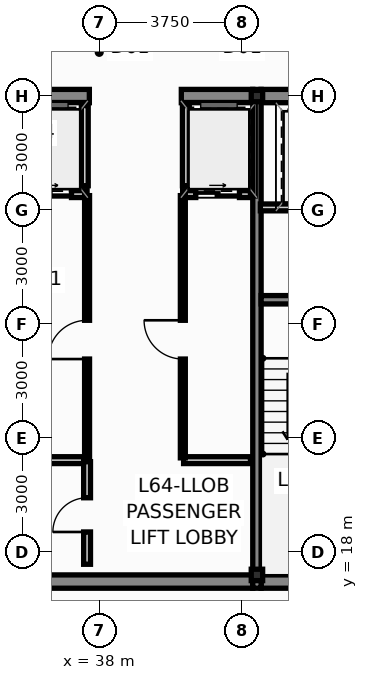
"""IFC4 building model, lengths in metres.
Left out: names, types, materials, properties, quantities, classifications, styles, units other than length and angle.
Written with IfcOpenShell. Run it as: python <this file> out.ifc"""

import sys

from ifc_helpers import new_model, si_unit, direction, frame, frame_2d, origin, origin_2d, place, context, subcontext, project, spatial, rectangle, hollow_rectangle, extrude, source, transform, mapped, element, fill, save


model = new_model("IFC4")
c1 = context("Model", 3, precision=1e-05, world=origin(), true_north=direction((0.0, 1.0)))
c2 = subcontext(c1, "Body", "Model", "MODEL_VIEW")
j1 = project(units=[si_unit("LENGTHUNIT", "METRE"), si_unit("PLANEANGLEUNIT", "RADIAN")], contexts=[c1])
p1 = place(None, origin())
s1 = spatial("IfcSite", under=j1, at=p1, CompositionType="ELEMENT")
p2 = place(p1, origin())
s2 = spatial("IfcBuilding", under=s1, at=p2, CompositionType="ELEMENT")
p3 = place(p2, frame((0.0, 0.0, 244.45)))
s3 = spatial("IfcBuildingStorey", under=s2, at=p3, CompositionType="ELEMENT", Elevation=244.45)
m1 = source(origin(), c2, "Body", "SweptSolid", [
    extrude(hollow_rectangle(XDim=0.3, YDim=0.3, WallThickness=0.012, at=origin_2d()), origin(), (0.0, 0.0, 1.0), 3.65),
])
for number, where, z_axis, x_axis in (
    (1, (42.15, 17.4, 0.0), (0.0, 0.0, 1.0), (1.0, 0.0, 0.0)),
    (2, (42.15, 30.0, 0.0), (0.0, 0.0, 1.0), (1.0, 0.0, 0.0)),
):
    element("IfcColumn", number, at=place(p3, frame(where, z_axis=z_axis, x_axis=x_axis)), inside=s3, PredefinedType="COLUMN", context=c2, shape_type="MappedRepresentation", body=[
        mapped(m1, transform((0.0, 0.0, 0.0), scale=1.0)),
    ])
p4 = place(p3, frame((33.96, 17.225, 0.0), z_axis=(0.0, 0.0, 1.0), x_axis=(1.0, 0.0, 0.0)))
e3 = element("IfcWall", 3, at=p4, inside=s3, PredefinedType="SHEAR", context=c2, shape_type="SweptSolid", body=[
    extrude(rectangle(XDim=8.08, YDim=0.35, at=frame_2d((4.04, 0.0))), origin(), (0.0, 0.0, 1.0), 3.65),
])
p5 = place(p3, frame((42.26, 17.225, 0.0), z_axis=(0.0, 0.0, 1.0), x_axis=(1.0, 0.0, 0.0)))
e4 = element("IfcWall", 4, at=p5, inside=s3, PredefinedType="SHEAR", context=c2, shape_type="SweptSolid", body=[
    extrude(rectangle(XDim=2.9, YDim=0.35, at=frame_2d((1.45, 0.0))), origin(), (0.0, 0.0, 1.0), 3.65),
])
p6 = place(p3, frame((33.96, 30.0, 0.0), z_axis=(0.0, 0.0, 1.0), x_axis=(1.0, 0.0, 0.0)))
e5 = element("IfcWall", 5, at=p6, inside=s3, PredefinedType="SHEAR", context=c2, shape_type="SweptSolid", body=[
    extrude(rectangle(XDim=3.78, YDim=0.35, at=frame_2d((1.89, 0.0))), origin(), (0.0, 0.0, 1.0), 3.65),
])
p7 = place(p3, frame((40.16, 30.0, 0.0), z_axis=(0.0, 0.0, 1.0), x_axis=(1.0, 0.0, 0.0)))
e6 = element("IfcWall", 6, at=p7, inside=s3, PredefinedType="SHEAR", context=c2, shape_type="SweptSolid", body=[
    extrude(rectangle(XDim=1.88, YDim=0.35, at=frame_2d((0.94, 0.0))), origin(), (0.0, 0.0, 1.0), 3.65),
])
p8 = place(p3, frame((42.26, 30.0, 0.0), z_axis=(0.0, 0.0, 1.0), x_axis=(1.0, 0.0, 0.0)))
e7 = element("IfcWall", 7, at=p8, inside=s3, PredefinedType="SHEAR", context=c2, shape_type="SweptSolid", body=[
    extrude(rectangle(XDim=2.9, YDim=0.35, at=frame_2d((1.45, 0.0))), origin(), (0.0, 0.0, 1.0), 3.65),
])
p9 = place(p3, frame((42.15, 17.05, 0.0), z_axis=(0.0, 0.0, 1.0), x_axis=(0.0, 1.0, 0.0)))
e8 = element("IfcWall", 8, at=p9, inside=s3, PredefinedType="SHEAR", context=c2, shape_type="SweptSolid", body=[
    extrude(rectangle(XDim=13.125, YDim=0.22, at=frame_2d((6.562, 0.0))), origin(), (0.0, 0.0, 1.0), 3.65),
])
p10 = place(p3, frame((42.26, 24.64, 0.0), z_axis=(0.0, 0.0, 1.0), x_axis=(1.0, 0.0, 0.0)))
e9 = element("IfcWall", 9, at=p10, inside=s3, PredefinedType="SHEAR", context=c2, shape_type="SweptSolid", body=[
    extrude(rectangle(XDim=2.9, YDim=0.22, at=frame_2d((1.45, 0.0))), origin(), (0.0, 0.0, 1.0), 3.65),
])
p11 = place(p3, frame((34.02, 27.42, 0.0), z_axis=(0.0, 0.0, 1.0), x_axis=(1.0, 0.0, 0.0)))
e10 = element("IfcWall", 10, at=p11, inside=s3, PredefinedType="PARTITIONING", context=c2, shape_type="SweptSolid", body=[
    extrude(rectangle(XDim=3.66, YDim=0.18, at=frame_2d((1.83, 0.0))), origin(), (0.0, 0.0, 1.0), 3.4),
])
p12 = place(p11, frame((0.3, 0.0, 0.0)))
e11 = element("IfcOpeningElement", 11, at=p12, cuts=e10, PredefinedType="OPENING", context=c2, shape_type="SweptSolid", body=[
    extrude(rectangle(XDim=1.15, YDim=2.2, at=frame_2d((0.575, 1.1))), frame((0.0, 0.102, 0.0), z_axis=(0.0, -1.0, 0.0), x_axis=(1.0, 0.0, 0.0)), (0.0, 0.0, 1.0), 0.204),
])
p13 = place(p11, frame((2.1, 0.0, 0.0)))
e12 = element("IfcOpeningElement", 12, at=p13, cuts=e10, PredefinedType="OPENING", context=c2, shape_type="SweptSolid", body=[
    extrude(rectangle(XDim=1.15, YDim=2.2, at=frame_2d((0.575, 1.1))), frame((0.0, 0.102, 0.0), z_axis=(0.0, -1.0, 0.0), x_axis=(1.0, 0.0, 0.0)), (0.0, 0.0, 1.0), 0.204),
])
p14 = place(p3, frame((40.22, 27.42, 0.0), z_axis=(0.0, 0.0, 1.0), x_axis=(1.0, 0.0, 0.0)))
e13 = element("IfcWall", 13, at=p14, inside=s3, PredefinedType="PARTITIONING", context=c2, shape_type="SweptSolid", body=[
    extrude(rectangle(XDim=1.76, YDim=0.18, at=frame_2d((0.88, 0.0))), origin(), (0.0, 0.0, 1.0), 3.4),
])
p15 = place(p14, frame((0.32, 0.0, 0.0)))
e14 = element("IfcOpeningElement", 14, at=p15, cuts=e13, PredefinedType="OPENING", context=c2, shape_type="SweptSolid", body=[
    extrude(rectangle(XDim=1.15, YDim=2.2, at=frame_2d((0.575, 1.1))), frame((0.0, 0.102, 0.0), z_axis=(0.0, -1.0, 0.0), x_axis=(1.0, 0.0, 0.0)), (0.0, 0.0, 1.0), 0.204),
])
for number, where, z_axis, x_axis in (
    (15, (37.62, 27.64, 0.0), (0.0, 0.0, 1.0), (0.0, 1.0, 0.0)),
    (16, (40.28, 27.64, 0.0), (0.0, 0.0, 1.0), (0.0, 1.0, 0.0)),
):
    element("IfcWall", number, at=place(p3, frame(where, z_axis=z_axis, x_axis=x_axis)), inside=s3, PredefinedType="PARTITIONING", context=c2, shape_type="SweptSolid", body=[
        extrude(rectangle(XDim=2.11, YDim=0.18, at=frame_2d((1.055, 0.0))), origin(), (0.0, 0.0, 1.0), 3.4),
    ])
p16 = place(p3, frame((42.24, 27.07, 0.0), z_axis=(0.0, 0.0, 1.0), x_axis=(1.0, 0.0, 0.0)))
e17 = element("IfcWall", 17, at=p16, inside=s3, PredefinedType="PARTITIONING", context=c2, shape_type="SweptSolid", body=[
    extrude(rectangle(XDim=2.9, YDim=0.18, at=frame_2d((1.45, 0.0))), origin(), (0.0, 0.0, 1.0), 3.4),
])
p17 = place(p3, frame((34.02, 20.42, 0.0), z_axis=(0.0, 0.0, 1.0), x_axis=(1.0, 0.0, 0.0)))
e18 = element("IfcWall", 18, at=p17, inside=s3, PredefinedType="PARTITIONING", context=c2, shape_type="SweptSolid", body=[
    extrude(rectangle(XDim=3.64, YDim=0.18, at=frame_2d((1.82, 0.0))), origin(), (0.0, 0.0, 1.0), 3.4),
])
p18 = place(p3, frame((40.22, 20.42, 0.0), z_axis=(0.0, 0.0, 1.0), x_axis=(1.0, 0.0, 0.0)))
e19 = element("IfcWall", 19, at=p18, inside=s3, PredefinedType="PARTITIONING", context=c2, shape_type="SweptSolid", body=[
    extrude(rectangle(XDim=1.76, YDim=0.18, at=frame_2d((0.88, 0.0))), origin(), (0.0, 0.0, 1.0), 3.4),
])
p19 = place(p3, frame((37.68, 20.48, 0.0), z_axis=(0.0, 0.0, 1.0), x_axis=(0.0, 1.0, 0.0)))
e20 = element("IfcWall", 20, at=p19, inside=s3, PredefinedType="PARTITIONING", context=c2, shape_type="SweptSolid", body=[
    extrude(rectangle(XDim=6.9, YDim=0.13, at=frame_2d((3.45, 0.0))), origin(), (0.0, 0.0, 1.0), 3.4),
])
p20 = place(p19, frame((2.6, 0.0, 0.0)))
e21 = element("IfcOpeningElement", 21, at=p20, cuts=e20, PredefinedType="OPENING", context=c2, shape_type="SweptSolid", body=[
    extrude(rectangle(XDim=1.02, YDim=2.15, at=frame_2d((0.51, 1.075))), frame((0.0, 0.077, 0.0), z_axis=(0.0, -1.0, 0.0), x_axis=(1.0, 0.0, 0.0)), (0.0, 0.0, 1.0), 0.154),
])
p21 = place(p3, frame((40.2, 20.48, 0.0), z_axis=(0.0, 0.0, 1.0), x_axis=(0.0, 1.0, 0.0)))
e22 = element("IfcWall", 22, at=p21, inside=s3, PredefinedType="PARTITIONING", context=c2, shape_type="SweptSolid", body=[
    extrude(rectangle(XDim=6.9, YDim=0.13, at=frame_2d((3.45, 0.0))), origin(), (0.0, 0.0, 1.0), 3.4),
])
p22 = place(p21, frame((2.6, 0.0, 0.0)))
e23 = element("IfcOpeningElement", 23, at=p22, cuts=e22, PredefinedType="OPENING", context=c2, shape_type="SweptSolid", body=[
    extrude(rectangle(XDim=1.02, YDim=2.15, at=frame_2d((0.51, 1.075))), frame((0.0, 0.077, 0.0), z_axis=(0.0, -1.0, 0.0), x_axis=(1.0, 0.0, 0.0)), (0.0, 0.0, 1.0), 0.154),
])
p23 = place(p3, frame((37.68, 17.68, 0.0), z_axis=(0.0, 0.0, 1.0), x_axis=(0.0, 1.0, 0.0)))
e24 = element("IfcWall", 24, at=p23, inside=s3, PredefinedType="PARTITIONING", context=c2, shape_type="SweptSolid", body=[
    extrude(rectangle(XDim=2.7, YDim=0.18, at=frame_2d((1.35, 0.0))), origin(), (0.0, 0.0, 1.0), 3.4),
])
p24 = place(p23, frame((0.85, 0.0, 0.0)))
e25 = element("IfcOpeningElement", 25, at=p24, cuts=e24, PredefinedType="OPENING", context=c2, shape_type="SweptSolid", body=[
    extrude(rectangle(XDim=0.9, YDim=2.1, at=frame_2d((0.45, 1.05))), frame((0.0, 0.102, 0.0), z_axis=(0.0, -1.0, 0.0), x_axis=(1.0, 0.0, 0.0)), (0.0, 0.0, 1.0), 0.204),
])
p25 = place(p13, origin())
e26 = element("IfcDoor", 26, at=p25, inside=s3, OperationType="SLIDING_TO_LEFT", PredefinedType="DOOR", context=c2, shape_type="SweptSolid", body=[
    extrude(rectangle(XDim=1.15, YDim=2.2, at=frame_2d((0.575, 1.1))), frame((0.0, 0.025, 0.0), z_axis=(0.0, -1.0, 0.0), x_axis=(1.0, 0.0, 0.0)), (0.0, 0.0, 1.0), 0.05),
])
fill(e12, e26)
p26 = place(p15, origin())
e27 = element("IfcDoor", 27, at=p26, inside=s3, OperationType="SLIDING_TO_RIGHT", PredefinedType="DOOR", context=c2, shape_type="SweptSolid", body=[
    extrude(rectangle(XDim=1.15, YDim=2.2, at=frame_2d((0.575, 1.1))), frame((0.0, 0.025, 0.0), z_axis=(0.0, -1.0, 0.0), x_axis=(1.0, 0.0, 0.0)), (0.0, 0.0, 1.0), 0.05),
])
fill(e14, e27)
p27 = place(p20, origin())
e28 = element("IfcDoor", 28, at=p27, inside=s3, OperationType="SINGLE_SWING_LEFT", PredefinedType="DOOR", context=c2, shape_type="SweptSolid", body=[
    extrude(rectangle(XDim=1.02, YDim=2.15, at=frame_2d((0.51, 1.075))), frame((0.0, 0.025, 0.0), z_axis=(0.0, -1.0, 0.0), x_axis=(1.0, 0.0, 0.0)), (0.0, 0.0, 1.0), 0.05),
])
fill(e21, e28)
p28 = place(p22, origin())
e29 = element("IfcDoor", 29, at=p28, inside=s3, OperationType="SINGLE_SWING_RIGHT", PredefinedType="DOOR", context=c2, shape_type="SweptSolid", body=[
    extrude(rectangle(XDim=1.02, YDim=2.15, at=frame_2d((0.51, 1.075))), frame((0.0, 0.025, 0.0), z_axis=(0.0, -1.0, 0.0), x_axis=(1.0, 0.0, 0.0)), (0.0, 0.0, 1.0), 0.05),
])
fill(e23, e29)
p29 = place(p24, origin())
e30 = element("IfcDoor", 30, at=p29, inside=s3, OperationType="SINGLE_SWING_LEFT", PredefinedType="DOOR", context=c2, shape_type="SweptSolid", body=[
    extrude(rectangle(XDim=0.9, YDim=2.1, at=frame_2d((0.45, 1.05))), frame((0.0, 0.025, 0.0), z_axis=(0.0, -1.0, 0.0), x_axis=(1.0, 0.0, 0.0)), (0.0, 0.0, 1.0), 0.05),
])
fill(e25, e30)
save(model, sys.argv[1])
